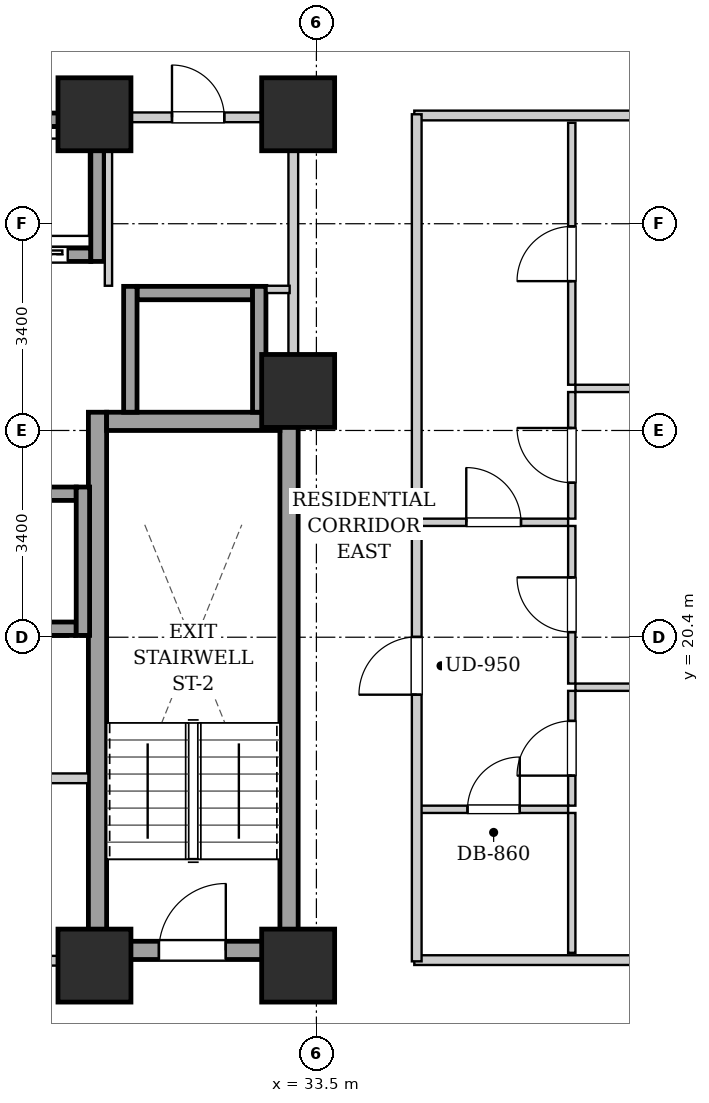
"""IFC4 building model, lengths in metres.
Left out: names, types, materials, properties, quantities, classifications, styles, units other than length and angle.
Written with IfcOpenShell. Run it as: python <this file> out.ifc"""

import sys

from ifc_helpers import new_model, si_unit, direction, frame, frame_2d, origin, origin_2d, place, context, subcontext, project, spatial, rectangle, extrude, element, fill, save


model = new_model("IFC4")
c1 = context("Model", 3, precision=1e-05, world=origin(), true_north=direction((0.0, 1.0)))
c2 = subcontext(c1, "Body", "Model", "MODEL_VIEW")
j1 = project(units=[si_unit("LENGTHUNIT", "METRE"), si_unit("PLANEANGLEUNIT", "RADIAN")], contexts=[c1])
p1 = place(None, origin())
s1 = spatial("IfcSite", under=j1, at=p1, CompositionType="ELEMENT")
p2 = place(p1, origin())
s2 = spatial("IfcBuilding", under=s1, at=p2, CompositionType="ELEMENT")
p3 = place(p2, frame((0.0, 0.0, 64.2)))
s3 = spatial("IfcBuildingStorey", under=s2, at=p3, CompositionType="ELEMENT", Elevation=64.2)
for number, where, z_axis, x_axis in (
    (1, (29.85, 15.0, 0.0), (0.0, 0.0, 1.0), (1.0, 0.0, 0.0)),
    (2, (33.2, 15.0, 0.0), (0.0, 0.0, 1.0), (1.0, 0.0, 0.0)),
    (3, (29.85, 29.0, 0.0), (0.0, 0.0, 1.0), (1.0, 0.0, 0.0)),
    (4, (33.2, 29.0, 0.0), (0.0, 0.0, 1.0), (1.0, 0.0, 0.0)),
    (5, (33.2, 24.45, 0.0), (0.0, 0.0, 1.0), (1.0, 0.0, 0.0)),
):
    element("IfcColumn", number, at=place(p3, frame(where, z_axis=z_axis, x_axis=x_axis)), inside=s3, PredefinedType="COLUMN", context=c2, shape_type="SweptSolid", body=[
        extrude(rectangle(XDim=1.2, YDim=1.2, at=origin_2d()), origin(), (0.0, 0.0, 1.0), 3.2),
    ])
for number, where, z_axis, x_axis in (
    (6, (29.9, 15.1, 0.0), (0.0, 0.0, 1.0), (0.0, 1.0, 0.0)),
    (7, (33.05, 15.1, 0.0), (0.0, 0.0, 1.0), (0.0, 1.0, 0.0)),
):
    element("IfcWall", number, at=place(p3, frame(where, z_axis=z_axis, x_axis=x_axis)), inside=s3, PredefinedType="SHEAR", context=c2, shape_type="SweptSolid", body=[
        extrude(rectangle(XDim=9.0, YDim=0.3, at=frame_2d((4.5, 0.0))), origin(), (0.0, 0.0, 1.0), 2.94),
    ])
p4 = place(p3, frame((30.05, 23.95, 0.0), z_axis=(0.0, 0.0, 1.0), x_axis=(1.0, 0.0, 0.0)))
e8 = element("IfcWall", 8, at=p4, inside=s3, PredefinedType="SHEAR", context=c2, shape_type="SweptSolid", body=[
    extrude(rectangle(XDim=2.85, YDim=0.3, at=frame_2d((1.425, 0.0))), origin(), (0.0, 0.0, 1.0), 2.94),
])
p5 = place(p3, frame((30.05, 15.25, 0.0), z_axis=(0.0, 0.0, 1.0), x_axis=(1.0, 0.0, 0.0)))
e9 = element("IfcWall", 9, at=p5, inside=s3, PredefinedType="SHEAR", context=c2, shape_type="SweptSolid", body=[
    extrude(rectangle(XDim=2.85, YDim=0.3, at=frame_2d((1.425, 0.0))), origin(), (0.0, 0.0, 1.0), 2.94),
])
p6 = place(p5, frame((0.86, 0.0, 0.0)))
e10 = element("IfcOpeningElement", 10, at=p6, cuts=e9, PredefinedType="OPENING", context=c2, shape_type="SweptSolid", body=[
    extrude(rectangle(XDim=1.1, YDim=2.05, at=frame_2d((0.55, 1.025))), frame((0.0, 0.16, 0.0), z_axis=(0.0, -1.0, 0.0), x_axis=(1.0, 0.0, 0.0)), (0.0, 0.0, 1.0), 0.32),
])
p7 = place(p3, frame((27.93, 26.69, 0.0), z_axis=(0.0, 0.0, 1.0), x_axis=(1.0, 0.0, 0.0)))
e11 = element("IfcWall", 11, at=p7, inside=s3, PredefinedType="SHEAR", context=c2, shape_type="SweptSolid", body=[
    extrude(rectangle(XDim=1.86, YDim=0.22, at=frame_2d((0.93, 0.0))), origin(), (0.0, 0.0, 1.0), 2.94),
])
p8 = place(p7, frame((0.38, 0.0, 0.0)))
e12 = element("IfcOpeningElement", 12, at=p8, cuts=e11, PredefinedType="OPENING", context=c2, shape_type="SweptSolid", body=[
    extrude(rectangle(XDim=1.1, YDim=2.15, at=frame_2d((0.55, 1.075))), frame((0.0, 0.12, 0.0), z_axis=(0.0, -1.0, 0.0), x_axis=(1.0, 0.0, 0.0)), (0.0, 0.0, 1.0), 0.24),
])
p9 = place(p3, frame((27.93, 28.91, 0.0), z_axis=(0.0, 0.0, 1.0), x_axis=(1.0, 0.0, 0.0)))
e13 = element("IfcWall", 13, at=p9, inside=s3, PredefinedType="SHEAR", context=c2, shape_type="SweptSolid", body=[
    extrude(rectangle(XDim=1.86, YDim=0.22, at=frame_2d((0.93, 0.0))), origin(), (0.0, 0.0, 1.0), 2.94),
])
p10 = place(p3, frame((29.9, 26.58, 0.0), z_axis=(0.0, 0.0, 1.0), x_axis=(0.0, 1.0, 0.0)))
e14 = element("IfcWall", 14, at=p10, inside=s3, PredefinedType="SHEAR", context=c2, shape_type="SweptSolid", body=[
    extrude(rectangle(XDim=2.44, YDim=0.22, at=frame_2d((1.22, 0.0))), origin(), (0.0, 0.0, 1.0), 2.94),
])
for number, where, z_axis, x_axis in (
    (15, (27.65, 20.54, 0.0), (0.0, 0.0, 1.0), (1.0, 0.0, 0.0)),
    (16, (27.65, 22.76, 0.0), (0.0, 0.0, 1.0), (1.0, 0.0, 0.0)),
):
    element("IfcWall", number, at=place(p3, frame(where, z_axis=z_axis, x_axis=x_axis)), inside=s3, PredefinedType="SHEAR", context=c2, shape_type="SweptSolid", body=[
        extrude(rectangle(XDim=1.9, YDim=0.22, at=frame_2d((0.95, 0.0))), origin(), (0.0, 0.0, 1.0), 2.94),
    ])
p11 = place(p3, frame((29.66, 20.43, 0.0), z_axis=(0.0, 0.0, 1.0), x_axis=(0.0, 1.0, 0.0)))
e17 = element("IfcWall", 17, at=p11, inside=s3, PredefinedType="SHEAR", context=c2, shape_type="SweptSolid", body=[
    extrude(rectangle(XDim=2.44, YDim=0.22, at=frame_2d((1.22, 0.0))), origin(), (0.0, 0.0, 1.0), 2.94),
])
p12 = place(p3, frame((30.55, 26.06, 0.0), z_axis=(0.0, 0.0, 1.0), x_axis=(1.0, 0.0, 0.0)))
e18 = element("IfcWall", 18, at=p12, inside=s3, PredefinedType="SHEAR", context=c2, shape_type="SweptSolid", body=[
    extrude(rectangle(XDim=1.9, YDim=0.22, at=frame_2d((0.95, 0.0))), origin(), (0.0, 0.0, 1.0), 2.94),
])
for number, where, z_axis, x_axis in (
    (19, (30.44, 24.1, 0.0), (0.0, 0.0, 1.0), (0.0, 1.0, 0.0)),
    (20, (32.56, 24.1, 0.0), (0.0, 0.0, 1.0), (0.0, 1.0, 0.0)),
):
    element("IfcWall", number, at=place(p3, frame(where, z_axis=z_axis, x_axis=x_axis)), inside=s3, PredefinedType="SHEAR", context=c2, shape_type="SweptSolid", body=[
        extrude(rectangle(XDim=2.07, YDim=0.22, at=frame_2d((1.035, 0.0))), origin(), (0.0, 0.0, 1.0), 2.94),
    ])
p13 = place(p3, frame((21.25, 15.08, 0.0), z_axis=(0.0, 0.0, 1.0), x_axis=(1.0, 0.0, 0.0)))
e21 = element("IfcWall", 21, at=p13, inside=s3, PredefinedType="PARTITIONING", context=c2, shape_type="SweptSolid", body=[
    extrude(rectangle(XDim=8.5, YDim=0.16, at=frame_2d((4.25, 0.0))), origin(), (0.0, 0.0, 1.0), 2.232),
])
p14 = place(p13, frame((3.725, 0.0, 0.0)))
e22 = element("IfcOpeningElement", 22, at=p14, cuts=e21, PredefinedType="OPENING", context=c2, shape_type="SweptSolid", body=[
    extrude(rectangle(XDim=1.05, YDim=2.05, at=frame_2d((0.525, 1.025))), frame((0.0, 0.09, 0.0), z_axis=(0.0, -1.0, 0.0), x_axis=(1.0, 0.0, 0.0)), (0.0, 0.0, 1.0), 0.18),
])
p15 = place(p3, frame((28.65, 18.08, 0.0), z_axis=(0.0, 0.0, 1.0), x_axis=(1.0, 0.0, 0.0)))
e23 = element("IfcWall", 23, at=p15, inside=s3, PredefinedType="PARTITIONING", context=c2, shape_type="SweptSolid", body=[
    extrude(rectangle(XDim=1.1, YDim=0.16, at=frame_2d((0.55, 0.0))), origin(), (0.0, 0.0, 1.0), 2.94),
])
p16 = place(p3, frame((33.12, 24.12, 0.0), z_axis=(0.0, 0.0, 1.0), x_axis=(0.0, 1.0, 0.0)))
e24 = element("IfcWall", 24, at=p16, inside=s3, PredefinedType="PARTITIONING", context=c2, shape_type="SweptSolid", body=[
    extrude(rectangle(XDim=4.76, YDim=0.16, at=frame_2d((2.38, 0.0))), origin(), (0.0, 0.0, 1.0), 2.94),
])
p17 = place(p3, frame((30.08, 26.18, 0.0), z_axis=(0.0, 0.0, 1.0), x_axis=(0.0, 1.0, 0.0)))
e25 = element("IfcWall", 25, at=p17, inside=s3, PredefinedType="PARTITIONING", context=c2, shape_type="SweptSolid", body=[
    extrude(rectangle(XDim=2.68, YDim=0.12, at=frame_2d((1.34, 0.0))), origin(), (0.0, 0.0, 1.0), 2.94),
])
p18 = place(p3, frame((32.68, 26.12, 0.0), z_axis=(0.0, 0.0, 1.0), x_axis=(1.0, 0.0, 0.0)))
e26 = element("IfcWall", 26, at=p18, inside=s3, PredefinedType="PARTITIONING", context=c2, shape_type="SweptSolid", body=[
    extrude(rectangle(XDim=0.38, YDim=0.12, at=frame_2d((0.19, 0.0))), origin(), (0.0, 0.0, 1.0), 2.94),
])
p19 = place(p3, frame((30.08, 28.95, 0.0), z_axis=(0.0, 0.0, 1.0), x_axis=(1.0, 0.0, 0.0)))
e27 = element("IfcWall", 27, at=p19, inside=s3, PredefinedType="PARTITIONING", context=c2, shape_type="SweptSolid", body=[
    extrude(rectangle(XDim=2.96, YDim=0.16, at=frame_2d((1.48, 0.0))), origin(), (0.0, 0.0, 1.0), 2.94),
])
p20 = place(p19, frame((1.045, 0.0, 0.0)))
e28 = element("IfcOpeningElement", 28, at=p20, cuts=e27, PredefinedType="OPENING", context=c2, shape_type="SweptSolid", body=[
    extrude(rectangle(XDim=0.86, YDim=2.05, at=frame_2d((0.43, 1.025))), frame((0.0, 0.09, 0.0), z_axis=(0.0, -1.0, 0.0), x_axis=(1.0, 0.0, 0.0)), (0.0, 0.0, 1.0), 0.18),
])
for number, where, z_axis, x_axis in (
    (29, (35.11, 15.09, 0.0), (0.0, 0.0, 1.0), (1.0, 0.0, 0.0)),
    (30, (35.11, 28.98, 0.0), (0.0, 0.0, 1.0), (1.0, 0.0, 0.0)),
):
    element("IfcWall", number, at=place(p3, frame(where, z_axis=z_axis, x_axis=x_axis)), inside=s3, PredefinedType="PARTITIONING", context=c2, shape_type="SweptSolid", body=[
        extrude(rectangle(XDim=11.11, YDim=0.16, at=frame_2d((5.555, 0.0))), origin(), (0.0, 0.0, 1.0), 2.232),
    ])
p21 = place(p3, frame((35.19, 22.29, 0.0), z_axis=(0.0, 0.0, 1.0), x_axis=(1.0, 0.0, 0.0)))
e31 = element("IfcWall", 31, at=p21, inside=s3, PredefinedType="PARTITIONING", context=c2, shape_type="SweptSolid", body=[
    extrude(rectangle(XDim=2.45, YDim=0.12, at=frame_2d((1.225, 0.0))), origin(), (0.0, 0.0, 1.0), 2.94),
])
p22 = place(p21, frame((0.775, 0.0, 0.0)))
e32 = element("IfcOpeningElement", 32, at=p22, cuts=e31, PredefinedType="OPENING", context=c2, shape_type="SweptSolid", body=[
    extrude(rectangle(XDim=0.9, YDim=2.05, at=frame_2d((0.45, 1.025))), frame((0.0, 0.07, 0.0), z_axis=(0.0, -1.0, 0.0), x_axis=(1.0, 0.0, 0.0)), (0.0, 0.0, 1.0), 0.14),
])
p23 = place(p3, frame((37.7, 22.35, 0.0), z_axis=(0.0, 0.0, 1.0), x_axis=(0.0, 1.0, 0.0)))
e33 = element("IfcWall", 33, at=p23, inside=s3, PredefinedType="PARTITIONING", context=c2, shape_type="SweptSolid", body=[
    extrude(rectangle(XDim=2.082, YDim=0.12, at=frame_2d((1.041, 0.0))), origin(), (0.0, 0.0, 1.0), 2.94),
])
p24 = place(p23, frame((0.591, 0.0, 0.0)))
e34 = element("IfcOpeningElement", 34, at=p24, cuts=e33, PredefinedType="OPENING", context=c2, shape_type="SweptSolid", body=[
    extrude(rectangle(XDim=0.9, YDim=2.05, at=frame_2d((0.45, 1.025))), frame((0.0, 0.07, 0.0), z_axis=(0.0, -1.0, 0.0), x_axis=(1.0, 0.0, 0.0)), (0.0, 0.0, 1.0), 0.14),
])
p25 = place(p3, frame((37.7, 24.552, 0.0), z_axis=(0.0, 0.0, 1.0), x_axis=(0.0, 1.0, 0.0)))
e35 = element("IfcWall", 35, at=p25, inside=s3, PredefinedType="PARTITIONING", context=c2, shape_type="SweptSolid", body=[
    extrude(rectangle(XDim=4.308, YDim=0.12, at=frame_2d((2.154, 0.0))), origin(), (0.0, 0.0, 1.0), 2.94),
])
p26 = place(p25, frame((1.704, 0.0, 0.0)))
e36 = element("IfcOpeningElement", 36, at=p26, cuts=e35, PredefinedType="OPENING", context=c2, shape_type="SweptSolid", body=[
    extrude(rectangle(XDim=0.9, YDim=2.05, at=frame_2d((0.45, 1.025))), frame((0.0, 0.07, 0.0), z_axis=(0.0, -1.0, 0.0), x_axis=(1.0, 0.0, 0.0)), (0.0, 0.0, 1.0), 0.14),
])
p27 = place(p3, frame((35.19, 17.57, 0.0), z_axis=(0.0, 0.0, 1.0), x_axis=(1.0, 0.0, 0.0)))
e37 = element("IfcWall", 37, at=p27, inside=s3, PredefinedType="PARTITIONING", context=c2, shape_type="SweptSolid", body=[
    extrude(rectangle(XDim=2.45, YDim=0.12, at=frame_2d((1.225, 0.0))), origin(), (0.0, 0.0, 1.0), 2.94),
])
p28 = place(p27, frame((0.795, 0.0, 0.0)))
e38 = element("IfcOpeningElement", 38, at=p28, cuts=e37, PredefinedType="OPENING", context=c2, shape_type="SweptSolid", body=[
    extrude(rectangle(XDim=0.86, YDim=2.05, at=frame_2d((0.43, 1.025))), frame((0.0, 0.07, 0.0), z_axis=(0.0, -1.0, 0.0), x_axis=(1.0, 0.0, 0.0)), (0.0, 0.0, 1.0), 0.14),
])
p29 = place(p3, frame((37.7, 15.21, 0.0), z_axis=(0.0, 0.0, 1.0), x_axis=(0.0, 1.0, 0.0)))
e39 = element("IfcWall", 39, at=p29, inside=s3, PredefinedType="PARTITIONING", context=c2, shape_type="SweptSolid", body=[
    extrude(rectangle(XDim=2.3, YDim=0.12, at=frame_2d((1.15, 0.0))), origin(), (0.0, 0.0, 1.0), 2.94),
])
p30 = place(p3, frame((37.7, 17.63, 0.0), z_axis=(0.0, 0.0, 1.0), x_axis=(0.0, 1.0, 0.0)))
e40 = element("IfcWall", 40, at=p30, inside=s3, PredefinedType="PARTITIONING", context=c2, shape_type="SweptSolid", body=[
    extrude(rectangle(XDim=1.888, YDim=0.12, at=frame_2d((0.944, 0.0))), origin(), (0.0, 0.0, 1.0), 2.94),
])
p31 = place(p30, frame((0.494, 0.0, 0.0)))
e41 = element("IfcOpeningElement", 41, at=p31, cuts=e40, PredefinedType="OPENING", context=c2, shape_type="SweptSolid", body=[
    extrude(rectangle(XDim=0.9, YDim=2.05, at=frame_2d((0.45, 1.025))), frame((0.0, 0.07, 0.0), z_axis=(0.0, -1.0, 0.0), x_axis=(1.0, 0.0, 0.0)), (0.0, 0.0, 1.0), 0.14),
])
p32 = place(p3, frame((37.7, 19.638, 0.0), z_axis=(0.0, 0.0, 1.0), x_axis=(0.0, 1.0, 0.0)))
e42 = element("IfcWall", 42, at=p32, inside=s3, PredefinedType="PARTITIONING", context=c2, shape_type="SweptSolid", body=[
    extrude(rectangle(XDim=2.592, YDim=0.12, at=frame_2d((1.296, 0.0))), origin(), (0.0, 0.0, 1.0), 2.94),
])
p33 = place(p32, frame((0.846, 0.0, 0.0)))
e43 = element("IfcOpeningElement", 43, at=p33, cuts=e42, PredefinedType="OPENING", context=c2, shape_type="SweptSolid", body=[
    extrude(rectangle(XDim=0.9, YDim=2.05, at=frame_2d((0.45, 1.025))), frame((0.0, 0.07, 0.0), z_axis=(0.0, -1.0, 0.0), x_axis=(1.0, 0.0, 0.0)), (0.0, 0.0, 1.0), 0.14),
])
p34 = place(p3, frame((37.76, 19.578, 0.0), z_axis=(0.0, 0.0, 1.0), x_axis=(1.0, 0.0, 0.0)))
e44 = element("IfcWall", 44, at=p34, inside=s3, PredefinedType="PARTITIONING", context=c2, shape_type="SweptSolid", body=[
    extrude(rectangle(XDim=6.31, YDim=0.12, at=frame_2d((3.155, 0.0))), origin(), (0.0, 0.0, 1.0), 2.94),
])
p35 = place(p34, frame((2.705, 0.0, 0.0)))
e45 = element("IfcOpeningElement", 45, at=p35, cuts=e44, PredefinedType="OPENING", context=c2, shape_type="SweptSolid", body=[
    extrude(rectangle(XDim=0.9, YDim=2.05, at=frame_2d((0.45, 1.025))), frame((0.0, 0.07, 0.0), z_axis=(0.0, -1.0, 0.0), x_axis=(1.0, 0.0, 0.0)), (0.0, 0.0, 1.0), 0.14),
])
p36 = place(p3, frame((37.76, 24.492, 0.0), z_axis=(0.0, 0.0, 1.0), x_axis=(1.0, 0.0, 0.0)))
e46 = element("IfcWall", 46, at=p36, inside=s3, PredefinedType="PARTITIONING", context=c2, shape_type="SweptSolid", body=[
    extrude(rectangle(XDim=6.31, YDim=0.12, at=frame_2d((3.155, 0.0))), origin(), (0.0, 0.0, 1.0), 2.508),
])
p37 = place(p36, frame((2.705, 0.0, 0.0)))
e47 = element("IfcOpeningElement", 47, at=p37, cuts=e46, PredefinedType="OPENING", context=c2, shape_type="SweptSolid", body=[
    extrude(rectangle(XDim=0.9, YDim=2.05, at=frame_2d((0.45, 1.025))), frame((0.0, 0.07, 0.0), z_axis=(0.0, -1.0, 0.0), x_axis=(1.0, 0.0, 0.0)), (0.0, 0.0, 1.0), 0.14),
])
p38 = place(p3, frame((35.15, 15.07, 0.0), z_axis=(0.0, 0.0, 1.0), x_axis=(0.0, 1.0, 0.0)))
e48 = element("IfcWall", 48, at=p38, inside=s3, PredefinedType="PARTITIONING", context=c2, shape_type="SweptSolid", body=[
    extrude(rectangle(XDim=13.93, YDim=0.16, at=frame_2d((6.965, 0.0))), origin(), (0.0, 0.0, 1.0), 2.94),
])
p39 = place(p38, frame((4.385, 0.0, 0.0)))
e49 = element("IfcOpeningElement", 49, at=p39, cuts=e48, PredefinedType="OPENING", context=c2, shape_type="SweptSolid", body=[
    extrude(rectangle(XDim=0.95, YDim=2.1, at=frame_2d((0.475, 1.05))), frame((0.0, 0.09, 0.0), z_axis=(0.0, -1.0, 0.0), x_axis=(1.0, 0.0, 0.0)), (0.0, 0.0, 1.0), 0.18),
])
p40 = place(p6, origin())
e50 = element("IfcDoor", 50, at=p40, inside=s3, OperationType="SINGLE_SWING_RIGHT", PredefinedType="DOOR", context=c2, shape_type="SweptSolid", body=[
    extrude(rectangle(XDim=1.1, YDim=2.05, at=frame_2d((0.55, 1.025))), frame((0.0, 0.025, 0.0), z_axis=(0.0, -1.0, 0.0), x_axis=(1.0, 0.0, 0.0)), (0.0, 0.0, 1.0), 0.05),
])
fill(e10, e50)
p41 = place(p8, origin())
e51 = element("IfcDoor", 51, at=p41, inside=s3, OperationType="SLIDING_TO_LEFT", PredefinedType="DOOR", context=c2, shape_type="SweptSolid", body=[
    extrude(rectangle(XDim=1.1, YDim=2.15, at=frame_2d((0.55, 1.075))), frame((0.0, 0.025, 0.0), z_axis=(0.0, -1.0, 0.0), x_axis=(1.0, 0.0, 0.0)), (0.0, 0.0, 1.0), 0.05),
])
fill(e12, e51)
p42 = place(p20, origin())
e52 = element("IfcDoor", 52, at=p42, inside=s3, OperationType="SINGLE_SWING_LEFT", PredefinedType="DOOR", context=c2, shape_type="SweptSolid", body=[
    extrude(rectangle(XDim=0.86, YDim=2.05, at=frame_2d((0.43, 1.025))), frame((0.0, 0.025, 0.0), z_axis=(0.0, -1.0, 0.0), x_axis=(1.0, 0.0, 0.0)), (0.0, 0.0, 1.0), 0.05),
])
fill(e28, e52)
p43 = place(p22, origin())
e53 = element("IfcDoor", 53, at=p43, inside=s3, OperationType="SINGLE_SWING_LEFT", PredefinedType="DOOR", context=c2, shape_type="SweptSolid", body=[
    extrude(rectangle(XDim=0.9, YDim=2.05, at=frame_2d((0.45, 1.025))), frame((0.0, 0.025, 0.0), z_axis=(0.0, -1.0, 0.0), x_axis=(1.0, 0.0, 0.0)), (0.0, 0.0, 1.0), 0.05),
])
fill(e32, e53)
p44 = place(p24, origin())
e54 = element("IfcDoor", 54, at=p44, inside=s3, OperationType="SINGLE_SWING_RIGHT", PredefinedType="DOOR", context=c2, shape_type="SweptSolid", body=[
    extrude(rectangle(XDim=0.9, YDim=2.05, at=frame_2d((0.45, 1.025))), frame((0.0, 0.025, 0.0), z_axis=(0.0, -1.0, 0.0), x_axis=(1.0, 0.0, 0.0)), (0.0, 0.0, 1.0), 0.05),
])
fill(e34, e54)
p45 = place(p26, origin())
e55 = element("IfcDoor", 55, at=p45, inside=s3, OperationType="SINGLE_SWING_LEFT", PredefinedType="DOOR", context=c2, shape_type="SweptSolid", body=[
    extrude(rectangle(XDim=0.9, YDim=2.05, at=frame_2d((0.45, 1.025))), frame((0.0, 0.025, 0.0), z_axis=(0.0, -1.0, 0.0), x_axis=(1.0, 0.0, 0.0)), (0.0, 0.0, 1.0), 0.05),
])
fill(e36, e55)
p46 = place(p28, origin())
e56 = element("IfcDoor", 56, at=p46, inside=s3, OperationType="SINGLE_SWING_RIGHT", PredefinedType="DOOR", context=c2, shape_type="SweptSolid", body=[
    extrude(rectangle(XDim=0.86, YDim=2.05, at=frame_2d((0.43, 1.025))), frame((0.0, 0.025, 0.0), z_axis=(0.0, -1.0, 0.0), x_axis=(1.0, 0.0, 0.0)), (0.0, 0.0, 1.0), 0.05),
])
fill(e38, e56)
p47 = place(p31, origin())
e57 = element("IfcDoor", 57, at=p47, inside=s3, OperationType="SINGLE_SWING_LEFT", PredefinedType="DOOR", context=c2, shape_type="SweptSolid", body=[
    extrude(rectangle(XDim=0.9, YDim=2.05, at=frame_2d((0.45, 1.025))), frame((0.0, 0.025, 0.0), z_axis=(0.0, -1.0, 0.0), x_axis=(1.0, 0.0, 0.0)), (0.0, 0.0, 1.0), 0.05),
])
fill(e41, e57)
p48 = place(p33, origin())
e58 = element("IfcDoor", 58, at=p48, inside=s3, OperationType="SINGLE_SWING_RIGHT", PredefinedType="DOOR", context=c2, shape_type="SweptSolid", body=[
    extrude(rectangle(XDim=0.9, YDim=2.05, at=frame_2d((0.45, 1.025))), frame((0.0, 0.025, 0.0), z_axis=(0.0, -1.0, 0.0), x_axis=(1.0, 0.0, 0.0)), (0.0, 0.0, 1.0), 0.05),
])
fill(e43, e58)
p49 = place(p39, origin())
e59 = element("IfcDoor", 59, at=p49, inside=s3, OperationType="SINGLE_SWING_LEFT", PredefinedType="DOOR", context=c2, shape_type="SweptSolid", body=[
    extrude(rectangle(XDim=0.95, YDim=2.1, at=frame_2d((0.475, 1.05))), frame((0.0, 0.025, 0.0), z_axis=(0.0, -1.0, 0.0), x_axis=(1.0, 0.0, 0.0)), (0.0, 0.0, 1.0), 0.05),
])
fill(e49, e59)
save(model, sys.argv[1])
